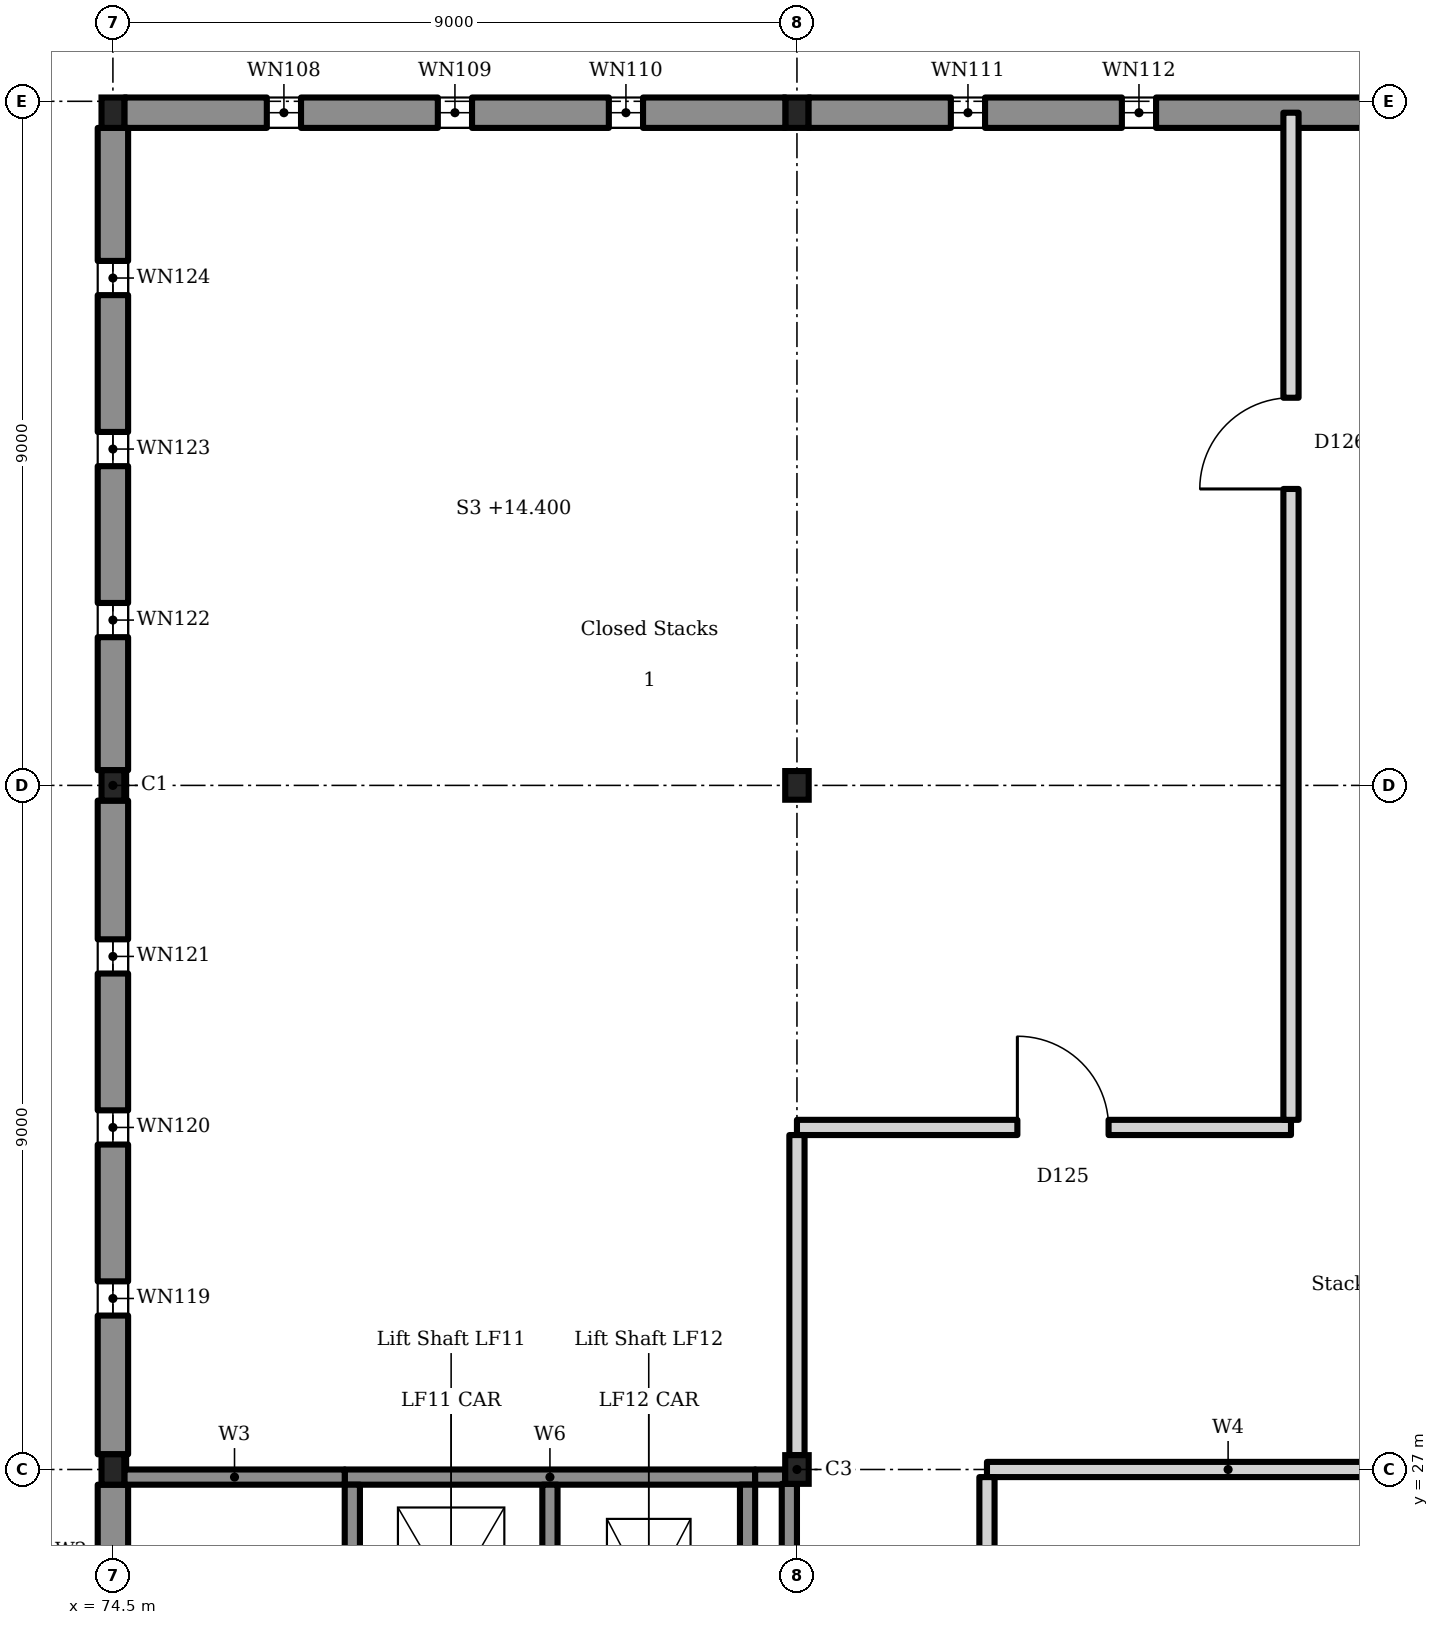
"""IFC4 building model, lengths in metres.
Left out: names, types, materials, properties, quantities, classifications, styles, units other than length and angle.
Written with IfcOpenShell. Run it as: python <this file> out.ifc"""

import sys

from ifc_helpers import new_model, si_unit, direction, frame, frame_2d, origin, origin_2d, place, context, subcontext, project, spatial, rectangle, i_section, extrude, element, fill, save


model = new_model("IFC4")
c1 = context("Model", 3, precision=1e-05, world=origin(), true_north=direction((0.0, 1.0)))
c2 = subcontext(c1, "Body", "Model", "MODEL_VIEW")
j1 = project(units=[si_unit("LENGTHUNIT", "METRE"), si_unit("PLANEANGLEUNIT", "RADIAN")], contexts=[c1])
p1 = place(None, origin())
s1 = spatial("IfcSite", under=j1, at=p1, CompositionType="ELEMENT")
p2 = place(p1, origin())
s2 = spatial("IfcBuilding", under=s1, at=p2, CompositionType="ELEMENT")
p3 = place(p2, frame((0.0, 0.0, 14.4)))
s3 = spatial("IfcBuildingStorey", under=s2, at=p3, CompositionType="ELEMENT", Elevation=14.4)
p4 = place(p3, frame((74.5, 27.0, 0.0), z_axis=(0.0, 0.0, 1.0), x_axis=(1.0, 0.0, 0.0)))
e1 = element("IfcColumn", 1, at=p4, inside=s3, PredefinedType="COLUMN", context=c2, shape_type="SweptSolid", body=[
    extrude(i_section(OverallWidth=0.3, OverallDepth=0.4, WebThickness=0.013, FlangeThickness=0.024, FilletRadius=0.027, at=origin_2d()), origin(), (0.0, 0.0, 1.0), 4.5),
])
p5 = place(p3, frame((83.5, 27.0, 0.0), z_axis=(0.0, 0.0, 1.0), x_axis=(1.0, 0.0, 0.0)))
e2 = element("IfcColumn", 2, at=p5, inside=s3, PredefinedType="COLUMN", context=c2, shape_type="SweptSolid", body=[
    extrude(i_section(OverallWidth=0.309, OverallDepth=0.377, WebThickness=0.021, FlangeThickness=0.04, FilletRadius=0.027, at=origin_2d()), origin(), (0.0, 0.0, 1.0), 4.5),
])
p6 = place(p3, frame((74.5, 36.0, 0.0), z_axis=(0.0, 0.0, 1.0), x_axis=(1.0, 0.0, 0.0)))
e3 = element("IfcColumn", 3, at=p6, inside=s3, PredefinedType="COLUMN", context=c2, shape_type="SweptSolid", body=[
    extrude(i_section(OverallWidth=0.3, OverallDepth=0.4, WebThickness=0.013, FlangeThickness=0.024, FilletRadius=0.027, at=origin_2d()), origin(), (0.0, 0.0, 1.0), 4.5),
])
p7 = place(p3, frame((83.5, 36.0, 0.0), z_axis=(0.0, 0.0, 1.0), x_axis=(1.0, 0.0, 0.0)))
e4 = element("IfcColumn", 4, at=p7, inside=s3, PredefinedType="COLUMN", context=c2, shape_type="SweptSolid", body=[
    extrude(i_section(OverallWidth=0.309, OverallDepth=0.377, WebThickness=0.021, FlangeThickness=0.04, FilletRadius=0.027, at=origin_2d()), origin(), (0.0, 0.0, 1.0), 4.5),
])
for number, where, z_axis, x_axis in (
    (5, (74.5, 44.85, 0.0), (0.0, 0.0, 1.0), (1.0, 0.0, 0.0)),
    (6, (83.5, 44.85, 0.0), (0.0, 0.0, 1.0), (1.0, 0.0, 0.0)),
):
    element("IfcColumn", number, at=place(p3, frame(where, z_axis=z_axis, x_axis=x_axis)), inside=s3, PredefinedType="COLUMN", context=c2, shape_type="SweptSolid", body=[
        extrude(i_section(OverallWidth=0.3, OverallDepth=0.4, WebThickness=0.013, FlangeThickness=0.024, FilletRadius=0.027, at=origin_2d()), origin(), (0.0, 0.0, 1.0), 4.5),
    ])
p8 = place(p3, frame((77.55, 26.9, 0.0), z_axis=(0.0, 0.0, 1.0), x_axis=(1.0, 0.0, 0.0)))
e7 = element("IfcWall", 7, at=p8, inside=s3, PredefinedType="SOLIDWALL", context=c2, shape_type="SweptSolid", body=[
    extrude(rectangle(XDim=5.4, YDim=0.2, at=frame_2d((2.7, 0.0))), origin(), (0.0, 0.0, 1.0), 4.25),
])
for number, where, z_axis, x_axis in (
    (8, (77.65, 23.8, 0.0), (0.0, 0.0, 1.0), (0.0, 1.0, 0.0)),
    (9, (80.25, 23.8, 0.0), (0.0, 0.0, 1.0), (0.0, 1.0, 0.0)),
    (10, (82.85, 23.8, 0.0), (0.0, 0.0, 1.0), (0.0, 1.0, 0.0)),
):
    element("IfcWall", number, at=place(p3, frame(where, z_axis=z_axis, x_axis=x_axis)), inside=s3, PredefinedType="SOLIDWALL", context=c2, shape_type="SweptSolid", body=[
        extrude(rectangle(XDim=3.0, YDim=0.2, at=frame_2d((1.5, 0.0))), origin(), (0.0, 0.0, 1.0), 4.25),
    ])
p9 = place(p3, frame((74.65, 44.85, 0.0), z_axis=(0.0, 0.0, 1.0), x_axis=(1.0, 0.0, 0.0)))
e11 = element("IfcWall", 11, at=p9, inside=s3, PredefinedType="SOLIDWALL", context=c2, shape_type="SweptSolid", body=[
    extrude(rectangle(XDim=8.7, YDim=0.4, at=frame_2d((4.35, 0.0))), origin(), (0.0, 0.0, 1.0), 4.5),
])
p10 = place(p9, frame((1.875, 0.0, 0.9)))
e12 = element("IfcOpeningElement", 12, at=p10, cuts=e11, PredefinedType="OPENING", context=c2, shape_type="SweptSolid", body=[
    extrude(rectangle(XDim=0.45, YDim=2.6, at=frame_2d((0.225, 1.3))), frame((0.0, 0.21, 0.0), z_axis=(0.0, -1.0, 0.0), x_axis=(1.0, 0.0, 0.0)), (0.0, 0.0, 1.0), 0.42),
])
p11 = place(p9, frame((4.125, 0.0, 0.9)))
e13 = element("IfcOpeningElement", 13, at=p11, cuts=e11, PredefinedType="OPENING", context=c2, shape_type="SweptSolid", body=[
    extrude(rectangle(XDim=0.45, YDim=2.6, at=frame_2d((0.225, 1.3))), frame((0.0, 0.21, 0.0), z_axis=(0.0, -1.0, 0.0), x_axis=(1.0, 0.0, 0.0)), (0.0, 0.0, 1.0), 0.42),
])
p12 = place(p9, frame((6.375, 0.0, 0.9)))
e14 = element("IfcOpeningElement", 14, at=p12, cuts=e11, PredefinedType="OPENING", context=c2, shape_type="SweptSolid", body=[
    extrude(rectangle(XDim=0.45, YDim=2.6, at=frame_2d((0.225, 1.3))), frame((0.0, 0.21, 0.0), z_axis=(0.0, -1.0, 0.0), x_axis=(1.0, 0.0, 0.0)), (0.0, 0.0, 1.0), 0.42),
])
p13 = place(p3, frame((83.65, 44.85, 0.0), z_axis=(0.0, 0.0, 1.0), x_axis=(1.0, 0.0, 0.0)))
e15 = element("IfcWall", 15, at=p13, inside=s3, PredefinedType="SOLIDWALL", context=c2, shape_type="SweptSolid", body=[
    extrude(rectangle(XDim=8.7, YDim=0.4, at=frame_2d((4.35, 0.0))), origin(), (0.0, 0.0, 1.0), 4.5),
])
p14 = place(p13, frame((1.875, 0.0, 0.9)))
e16 = element("IfcOpeningElement", 16, at=p14, cuts=e15, PredefinedType="OPENING", context=c2, shape_type="SweptSolid", body=[
    extrude(rectangle(XDim=0.45, YDim=2.6, at=frame_2d((0.225, 1.3))), frame((0.0, 0.21, 0.0), z_axis=(0.0, -1.0, 0.0), x_axis=(1.0, 0.0, 0.0)), (0.0, 0.0, 1.0), 0.42),
])
p15 = place(p13, frame((4.125, 0.0, 0.9)))
e17 = element("IfcOpeningElement", 17, at=p15, cuts=e15, PredefinedType="OPENING", context=c2, shape_type="SweptSolid", body=[
    extrude(rectangle(XDim=0.45, YDim=2.6, at=frame_2d((0.225, 1.3))), frame((0.0, 0.21, 0.0), z_axis=(0.0, -1.0, 0.0), x_axis=(1.0, 0.0, 0.0)), (0.0, 0.0, 1.0), 0.42),
])
p16 = place(p3, frame((74.5, 18.2, 0.0), z_axis=(0.0, 0.0, 1.0), x_axis=(0.0, 1.0, 0.0)))
e18 = element("IfcWall", 18, at=p16, inside=s3, PredefinedType="SOLIDWALL", context=c2, shape_type="SweptSolid", body=[
    extrude(rectangle(XDim=8.6, YDim=0.4, at=frame_2d((4.3, 0.0))), origin(), (0.0, 0.0, 1.0), 4.5),
])
p17 = place(p16, frame((1.75, 0.0, 0.9)))
e19 = element("IfcOpeningElement", 19, at=p17, cuts=e18, PredefinedType="OPENING", context=c2, shape_type="SweptSolid", body=[
    extrude(rectangle(XDim=0.6, YDim=2.4, at=frame_2d((0.3, 1.2))), frame((0.0, 0.21, 0.0), z_axis=(0.0, -1.0, 0.0), x_axis=(1.0, 0.0, 0.0)), (0.0, 0.0, 1.0), 0.42),
])
p18 = place(p16, frame((4.0, 0.0, 0.9)))
e20 = element("IfcOpeningElement", 20, at=p18, cuts=e18, PredefinedType="OPENING", context=c2, shape_type="SweptSolid", body=[
    extrude(rectangle(XDim=0.6, YDim=2.4, at=frame_2d((0.3, 1.2))), frame((0.0, 0.21, 0.0), z_axis=(0.0, -1.0, 0.0), x_axis=(1.0, 0.0, 0.0)), (0.0, 0.0, 1.0), 0.42),
])
p19 = place(p16, frame((6.25, 0.0, 0.9)))
e21 = element("IfcOpeningElement", 21, at=p19, cuts=e18, PredefinedType="OPENING", context=c2, shape_type="SweptSolid", body=[
    extrude(rectangle(XDim=0.6, YDim=2.4, at=frame_2d((0.3, 1.2))), frame((0.0, 0.21, 0.0), z_axis=(0.0, -1.0, 0.0), x_axis=(1.0, 0.0, 0.0)), (0.0, 0.0, 1.0), 0.42),
])
p20 = place(p3, frame((74.5, 27.2, 0.0), z_axis=(0.0, 0.0, 1.0), x_axis=(0.0, 1.0, 0.0)))
e22 = element("IfcWall", 22, at=p20, inside=s3, PredefinedType="SOLIDWALL", context=c2, shape_type="SweptSolid", body=[
    extrude(rectangle(XDim=8.6, YDim=0.4, at=frame_2d((4.3, 0.0))), origin(), (0.0, 0.0, 1.0), 4.5),
])
p21 = place(p20, frame((1.825, 0.0, 0.9)))
e23 = element("IfcOpeningElement", 23, at=p21, cuts=e22, PredefinedType="OPENING", context=c2, shape_type="SweptSolid", body=[
    extrude(rectangle(XDim=0.45, YDim=2.6, at=frame_2d((0.225, 1.3))), frame((0.0, 0.21, 0.0), z_axis=(0.0, -1.0, 0.0), x_axis=(1.0, 0.0, 0.0)), (0.0, 0.0, 1.0), 0.42),
])
p22 = place(p20, frame((4.075, 0.0, 0.9)))
e24 = element("IfcOpeningElement", 24, at=p22, cuts=e22, PredefinedType="OPENING", context=c2, shape_type="SweptSolid", body=[
    extrude(rectangle(XDim=0.45, YDim=2.6, at=frame_2d((0.225, 1.3))), frame((0.0, 0.21, 0.0), z_axis=(0.0, -1.0, 0.0), x_axis=(1.0, 0.0, 0.0)), (0.0, 0.0, 1.0), 0.42),
])
p23 = place(p20, frame((6.325, 0.0, 0.9)))
e25 = element("IfcOpeningElement", 25, at=p23, cuts=e22, PredefinedType="OPENING", context=c2, shape_type="SweptSolid", body=[
    extrude(rectangle(XDim=0.45, YDim=2.6, at=frame_2d((0.225, 1.3))), frame((0.0, 0.21, 0.0), z_axis=(0.0, -1.0, 0.0), x_axis=(1.0, 0.0, 0.0)), (0.0, 0.0, 1.0), 0.42),
])
p24 = place(p3, frame((74.5, 36.2, 0.0), z_axis=(0.0, 0.0, 1.0), x_axis=(0.0, 1.0, 0.0)))
e26 = element("IfcWall", 26, at=p24, inside=s3, PredefinedType="SOLIDWALL", context=c2, shape_type="SweptSolid", body=[
    extrude(rectangle(XDim=8.45, YDim=0.4, at=frame_2d((4.225, 0.0))), origin(), (0.0, 0.0, 1.0), 4.5),
])
p25 = place(p24, frame((1.75, 0.0, 0.9)))
e27 = element("IfcOpeningElement", 27, at=p25, cuts=e26, PredefinedType="OPENING", context=c2, shape_type="SweptSolid", body=[
    extrude(rectangle(XDim=0.45, YDim=2.6, at=frame_2d((0.225, 1.3))), frame((0.0, 0.21, 0.0), z_axis=(0.0, -1.0, 0.0), x_axis=(1.0, 0.0, 0.0)), (0.0, 0.0, 1.0), 0.42),
])
p26 = place(p24, frame((4.0, 0.0, 0.9)))
e28 = element("IfcOpeningElement", 28, at=p26, cuts=e26, PredefinedType="OPENING", context=c2, shape_type="SweptSolid", body=[
    extrude(rectangle(XDim=0.45, YDim=2.6, at=frame_2d((0.225, 1.3))), frame((0.0, 0.21, 0.0), z_axis=(0.0, -1.0, 0.0), x_axis=(1.0, 0.0, 0.0)), (0.0, 0.0, 1.0), 0.42),
])
p27 = place(p24, frame((6.25, 0.0, 0.9)))
e29 = element("IfcOpeningElement", 29, at=p27, cuts=e26, PredefinedType="OPENING", context=c2, shape_type="SweptSolid", body=[
    extrude(rectangle(XDim=0.45, YDim=2.6, at=frame_2d((0.225, 1.3))), frame((0.0, 0.21, 0.0), z_axis=(0.0, -1.0, 0.0), x_axis=(1.0, 0.0, 0.0)), (0.0, 0.0, 1.0), 0.42),
])
p28 = place(p3, frame((74.65, 26.9, 0.0), z_axis=(0.0, 0.0, 1.0), x_axis=(1.0, 0.0, 0.0)))
e30 = element("IfcWall", 30, at=p28, inside=s3, PredefinedType="SOLIDWALL", context=c2, shape_type="SweptSolid", body=[
    extrude(rectangle(XDim=2.9, YDim=0.2, at=frame_2d((1.45, 0.0))), origin(), (0.0, 0.0, 1.0), 4.25),
])
p29 = place(p3, frame((82.95, 26.9, 0.0), z_axis=(0.0, 0.0, 1.0), x_axis=(1.0, 0.0, 0.0)))
e31 = element("IfcWall", 31, at=p29, inside=s3, PredefinedType="SOLIDWALL", context=c2, shape_type="SweptSolid", body=[
    extrude(rectangle(XDim=0.396, YDim=0.2, at=frame_2d((0.198, 0.0))), origin(), (0.0, 0.0, 1.0), 4.25),
])
p30 = place(p3, frame((83.4, 18.2, 0.0), z_axis=(0.0, 0.0, 1.0), x_axis=(0.0, 1.0, 0.0)))
e32 = element("IfcWall", 32, at=p30, inside=s3, PredefinedType="SOLIDWALL", context=c2, shape_type="SweptSolid", body=[
    extrude(rectangle(XDim=8.612, YDim=0.2, at=frame_2d((4.306, 0.0))), origin(), (0.0, 0.0, 1.0), 4.25),
])
p31 = place(p30, frame((2.75, 0.0, 0.0)))
e33 = element("IfcOpeningElement", 33, at=p31, cuts=e32, PredefinedType="OPENING", context=c2, shape_type="SweptSolid", body=[
    extrude(rectangle(XDim=1.1, YDim=2.1, at=frame_2d((0.55, 1.05))), frame((0.0, 0.11, 0.0), z_axis=(0.0, -1.0, 0.0), x_axis=(1.0, 0.0, 0.0)), (0.0, 0.0, 1.0), 0.22),
])
p32 = place(p3, frame((86.0, 27.0, 0.0), z_axis=(0.0, 0.0, 1.0), x_axis=(1.0, 0.0, 0.0)))
e34 = element("IfcWall", 34, at=p32, inside=s3, PredefinedType="SOLIDWALL", context=c2, shape_type="SweptSolid", body=[
    extrude(rectangle(XDim=6.345, YDim=0.2, at=frame_2d((3.173, 0.0))), origin(), (0.0, 0.0, 1.0), 3.6),
])
p33 = place(p3, frame((83.5, 31.5, 0.0), z_axis=(0.0, 0.0, 1.0), x_axis=(1.0, 0.0, 0.0)))
e35 = element("IfcWall", 35, at=p33, inside=s3, PredefinedType="SOLIDWALL", context=c2, shape_type="SweptSolid", body=[
    extrude(rectangle(XDim=6.5, YDim=0.2, at=frame_2d((3.25, 0.0))), origin(), (0.0, 0.0, 1.0), 3.6),
])
p34 = place(p33, frame((2.9, 0.0, 0.0)))
e36 = element("IfcOpeningElement", 36, at=p34, cuts=e35, PredefinedType="OPENING", context=c2, shape_type="SweptSolid", body=[
    extrude(rectangle(XDim=1.2, YDim=2.1, at=frame_2d((0.6, 1.05))), frame((0.0, 0.11, 0.0), z_axis=(0.0, -1.0, 0.0), x_axis=(1.0, 0.0, 0.0)), (0.0, 0.0, 1.0), 0.22),
])
p35 = place(p3, frame((83.5, 27.188, 0.0), z_axis=(0.0, 0.0, 1.0), x_axis=(0.0, 1.0, 0.0)))
e37 = element("IfcWall", 37, at=p35, inside=s3, PredefinedType="SOLIDWALL", context=c2, shape_type="SweptSolid", body=[
    extrude(rectangle(XDim=4.211, YDim=0.2, at=frame_2d((2.106, 0.0))), origin(), (0.0, 0.0, 1.0), 3.6),
])
p36 = place(p3, frame((86.0, 18.0, 0.0), z_axis=(0.0, 0.0, 1.0), x_axis=(0.0, 1.0, 0.0)))
e38 = element("IfcWall", 38, at=p36, inside=s3, PredefinedType="SOLIDWALL", context=c2, shape_type="SweptSolid", body=[
    extrude(rectangle(XDim=8.9, YDim=0.2, at=frame_2d((4.45, 0.0))), origin(), (0.0, 0.0, 1.0), 3.6),
])
p37 = place(p36, frame((3.9, 0.0, 0.0)))
e39 = element("IfcOpeningElement", 39, at=p37, cuts=e38, PredefinedType="OPENING", context=c2, shape_type="SweptSolid", body=[
    extrude(rectangle(XDim=1.2, YDim=2.1, at=frame_2d((0.6, 1.05))), frame((0.0, 0.11, 0.0), z_axis=(0.0, -1.0, 0.0), x_axis=(1.0, 0.0, 0.0)), (0.0, 0.0, 1.0), 0.22),
])
p38 = place(p3, frame((90.0, 31.6, 0.0), z_axis=(0.0, 0.0, 1.0), x_axis=(0.0, 1.0, 0.0)))
e40 = element("IfcWall", 40, at=p38, inside=s3, PredefinedType="SOLIDWALL", context=c2, shape_type="SweptSolid", body=[
    extrude(rectangle(XDim=13.25, YDim=0.2, at=frame_2d((6.625, 0.0))), origin(), (0.0, 0.0, 1.0), 3.6),
])
p39 = place(p38, frame((8.3, 0.0, 0.0)))
e41 = element("IfcOpeningElement", 41, at=p39, cuts=e40, PredefinedType="OPENING", context=c2, shape_type="SweptSolid", body=[
    extrude(rectangle(XDim=1.2, YDim=2.1, at=frame_2d((0.6, 1.05))), frame((0.0, 0.11, 0.0), z_axis=(0.0, -1.0, 0.0), x_axis=(1.0, 0.0, 0.0)), (0.0, 0.0, 1.0), 0.22),
])
p40 = place(p10, origin())
e42 = element("IfcWindow", 42, at=p40, inside=s3, PartitioningType="SINGLE_PANEL", PredefinedType="WINDOW", context=c2, shape_type="SweptSolid", body=[
    extrude(rectangle(XDim=0.45, YDim=2.6, at=frame_2d((0.225, 1.3))), frame((0.0, 0.03, 0.0), z_axis=(0.0, -1.0, 0.0), x_axis=(1.0, 0.0, 0.0)), (0.0, 0.0, 1.0), 0.06),
])
fill(e12, e42)
p41 = place(p11, origin())
e43 = element("IfcWindow", 43, at=p41, inside=s3, PartitioningType="SINGLE_PANEL", PredefinedType="WINDOW", context=c2, shape_type="SweptSolid", body=[
    extrude(rectangle(XDim=0.45, YDim=2.6, at=frame_2d((0.225, 1.3))), frame((0.0, 0.03, 0.0), z_axis=(0.0, -1.0, 0.0), x_axis=(1.0, 0.0, 0.0)), (0.0, 0.0, 1.0), 0.06),
])
fill(e13, e43)
p42 = place(p12, origin())
e44 = element("IfcWindow", 44, at=p42, inside=s3, PartitioningType="SINGLE_PANEL", PredefinedType="WINDOW", context=c2, shape_type="SweptSolid", body=[
    extrude(rectangle(XDim=0.45, YDim=2.6, at=frame_2d((0.225, 1.3))), frame((0.0, 0.03, 0.0), z_axis=(0.0, -1.0, 0.0), x_axis=(1.0, 0.0, 0.0)), (0.0, 0.0, 1.0), 0.06),
])
fill(e14, e44)
p43 = place(p14, origin())
e45 = element("IfcWindow", 45, at=p43, inside=s3, PartitioningType="SINGLE_PANEL", PredefinedType="WINDOW", context=c2, shape_type="SweptSolid", body=[
    extrude(rectangle(XDim=0.45, YDim=2.6, at=frame_2d((0.225, 1.3))), frame((0.0, 0.03, 0.0), z_axis=(0.0, -1.0, 0.0), x_axis=(1.0, 0.0, 0.0)), (0.0, 0.0, 1.0), 0.06),
])
fill(e16, e45)
p44 = place(p15, origin())
e46 = element("IfcWindow", 46, at=p44, inside=s3, PartitioningType="SINGLE_PANEL", PredefinedType="WINDOW", context=c2, shape_type="SweptSolid", body=[
    extrude(rectangle(XDim=0.45, YDim=2.6, at=frame_2d((0.225, 1.3))), frame((0.0, 0.03, 0.0), z_axis=(0.0, -1.0, 0.0), x_axis=(1.0, 0.0, 0.0)), (0.0, 0.0, 1.0), 0.06),
])
fill(e17, e46)
p45 = place(p21, origin())
e47 = element("IfcWindow", 47, at=p45, inside=s3, PartitioningType="SINGLE_PANEL", PredefinedType="WINDOW", context=c2, shape_type="SweptSolid", body=[
    extrude(rectangle(XDim=0.45, YDim=2.6, at=frame_2d((0.225, 1.3))), frame((0.0, 0.03, 0.0), z_axis=(0.0, -1.0, 0.0), x_axis=(1.0, 0.0, 0.0)), (0.0, 0.0, 1.0), 0.06),
])
fill(e23, e47)
p46 = place(p22, origin())
e48 = element("IfcWindow", 48, at=p46, inside=s3, PartitioningType="SINGLE_PANEL", PredefinedType="WINDOW", context=c2, shape_type="SweptSolid", body=[
    extrude(rectangle(XDim=0.45, YDim=2.6, at=frame_2d((0.225, 1.3))), frame((0.0, 0.03, 0.0), z_axis=(0.0, -1.0, 0.0), x_axis=(1.0, 0.0, 0.0)), (0.0, 0.0, 1.0), 0.06),
])
fill(e24, e48)
p47 = place(p23, origin())
e49 = element("IfcWindow", 49, at=p47, inside=s3, PartitioningType="SINGLE_PANEL", PredefinedType="WINDOW", context=c2, shape_type="SweptSolid", body=[
    extrude(rectangle(XDim=0.45, YDim=2.6, at=frame_2d((0.225, 1.3))), frame((0.0, 0.03, 0.0), z_axis=(0.0, -1.0, 0.0), x_axis=(1.0, 0.0, 0.0)), (0.0, 0.0, 1.0), 0.06),
])
fill(e25, e49)
p48 = place(p25, origin())
e50 = element("IfcWindow", 50, at=p48, inside=s3, PartitioningType="SINGLE_PANEL", PredefinedType="WINDOW", context=c2, shape_type="SweptSolid", body=[
    extrude(rectangle(XDim=0.45, YDim=2.6, at=frame_2d((0.225, 1.3))), frame((0.0, 0.03, 0.0), z_axis=(0.0, -1.0, 0.0), x_axis=(1.0, 0.0, 0.0)), (0.0, 0.0, 1.0), 0.06),
])
fill(e27, e50)
p49 = place(p26, origin())
e51 = element("IfcWindow", 51, at=p49, inside=s3, PartitioningType="SINGLE_PANEL", PredefinedType="WINDOW", context=c2, shape_type="SweptSolid", body=[
    extrude(rectangle(XDim=0.45, YDim=2.6, at=frame_2d((0.225, 1.3))), frame((0.0, 0.03, 0.0), z_axis=(0.0, -1.0, 0.0), x_axis=(1.0, 0.0, 0.0)), (0.0, 0.0, 1.0), 0.06),
])
fill(e28, e51)
p50 = place(p27, origin())
e52 = element("IfcWindow", 52, at=p50, inside=s3, PartitioningType="SINGLE_PANEL", PredefinedType="WINDOW", context=c2, shape_type="SweptSolid", body=[
    extrude(rectangle(XDim=0.45, YDim=2.6, at=frame_2d((0.225, 1.3))), frame((0.0, 0.03, 0.0), z_axis=(0.0, -1.0, 0.0), x_axis=(1.0, 0.0, 0.0)), (0.0, 0.0, 1.0), 0.06),
])
fill(e29, e52)
p51 = place(p34, origin())
e53 = element("IfcDoor", 53, at=p51, inside=s3, OperationType="DOUBLE_DOOR_SINGLE_SWING", PredefinedType="DOOR", context=c2, shape_type="SweptSolid", body=[
    extrude(rectangle(XDim=1.2, YDim=2.1, at=frame_2d((0.6, 1.05))), frame((0.0, 0.025, 0.0), z_axis=(0.0, -1.0, 0.0), x_axis=(1.0, 0.0, 0.0)), (0.0, 0.0, 1.0), 0.05),
])
fill(e36, e53)
p52 = place(p39, origin())
e54 = element("IfcDoor", 54, at=p52, inside=s3, OperationType="DOUBLE_DOOR_SINGLE_SWING", PredefinedType="DOOR", context=c2, shape_type="SweptSolid", body=[
    extrude(rectangle(XDim=1.2, YDim=2.1, at=frame_2d((0.6, 1.05))), frame((0.0, 0.025, 0.0), z_axis=(0.0, -1.0, 0.0), x_axis=(1.0, 0.0, 0.0)), (0.0, 0.0, 1.0), 0.05),
])
fill(e41, e54)
save(model, sys.argv[1])
